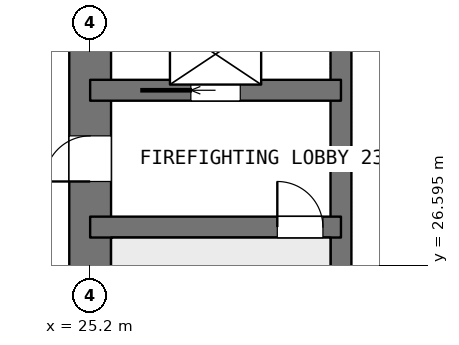
"""IFC4 building model, lengths in metres.
Left out: names, types, materials, properties, quantities, classifications, styles, units other than length and angle.
Written with IfcOpenShell. Run it as: python <this file> out.ifc"""

import sys

from ifc_helpers import new_model, si_unit, direction, frame, frame_2d, origin, place, context, subcontext, project, spatial, rectangle, extrude, element, fill, save


model = new_model("IFC4")
c1 = context("Model", 3, precision=1e-05, world=origin(), true_north=direction((0.0, 1.0)))
c2 = subcontext(c1, "Body", "Model", "MODEL_VIEW")
j1 = project(units=[si_unit("LENGTHUNIT", "METRE"), si_unit("PLANEANGLEUNIT", "RADIAN")], contexts=[c1])
p1 = place(None, origin())
s1 = spatial("IfcSite", under=j1, at=p1, CompositionType="ELEMENT")
p2 = place(p1, origin())
s2 = spatial("IfcBuilding", under=s1, at=p2, CompositionType="ELEMENT")
p3 = place(p2, frame((0.0, 0.0, 51.65)))
s3 = spatial("IfcBuildingStorey", under=s2, at=p3, CompositionType="ELEMENT", Elevation=51.65)
p4 = place(p3, frame((25.2, 21.0, 0.0), z_axis=(0.0, 0.0, 1.0), x_axis=(0.0, 1.0, 0.0)))
e1 = element("IfcWall", 1, at=p4, inside=s3, PredefinedType="SHEAR", context=c2, shape_type="SweptSolid", body=[
    extrude(rectangle(XDim=25.2, YDim=1.1, at=frame_2d((12.6, 0.0))), origin(), (0.0, 0.0, 1.0), 3.75),
])
p5 = place(p4, frame((7.8, 0.0, 0.0)))
e2 = element("IfcOpeningElement", 2, at=p5, cuts=e1, PredefinedType="OPENING", context=c2, shape_type="SweptSolid", body=[
    extrude(rectangle(XDim=1.2, YDim=2.1, at=frame_2d((0.6, 1.05))), frame((0.0, 0.56, 0.0), z_axis=(0.0, -1.0, 0.0), x_axis=(1.0, 0.0, 0.0)), (0.0, 0.0, 1.0), 1.12),
])
p6 = place(p4, frame((14.25, 0.0, 0.0)))
e3 = element("IfcOpeningElement", 3, at=p6, cuts=e1, PredefinedType="OPENING", context=c2, shape_type="SweptSolid", body=[
    extrude(rectangle(XDim=0.9, YDim=2.1, at=frame_2d((0.45, 1.05))), frame((0.0, 0.56, 0.0), z_axis=(0.0, -1.0, 0.0), x_axis=(1.0, 0.0, 0.0)), (0.0, 0.0, 1.0), 1.12),
])
p7 = place(p4, frame((16.85, 0.0, 0.0)))
e4 = element("IfcOpeningElement", 4, at=p7, cuts=e1, PredefinedType="OPENING", context=c2, shape_type="SweptSolid", body=[
    extrude(rectangle(XDim=0.9, YDim=2.1, at=frame_2d((0.45, 1.05))), frame((0.0, 0.56, 0.0), z_axis=(0.0, -1.0, 0.0), x_axis=(1.0, 0.0, 0.0)), (0.0, 0.0, 1.0), 1.12),
])
p8 = place(p4, frame((19.075, 0.0, 0.0)))
e5 = element("IfcOpeningElement", 5, at=p8, cuts=e1, PredefinedType="OPENING", context=c2, shape_type="SweptSolid", body=[
    extrude(rectangle(XDim=1.2, YDim=2.1, at=frame_2d((0.6, 1.05))), frame((0.0, 0.56, 0.0), z_axis=(0.0, -1.0, 0.0), x_axis=(1.0, 0.0, 0.0)), (0.0, 0.0, 1.0), 1.12),
])
p9 = place(p3, frame((31.8, 21.0, 0.0), z_axis=(0.0, 0.0, 1.0), x_axis=(0.0, 1.0, 0.0)))
e6 = element("IfcWall", 6, at=p9, inside=s3, PredefinedType="SHEAR", context=c2, shape_type="SweptSolid", body=[
    extrude(rectangle(XDim=25.2, YDim=0.55, at=frame_2d((12.6, 0.0))), origin(), (0.0, 0.0, 1.0), 3.75),
])
p10 = place(p3, frame((25.2, 27.6, 0.0), z_axis=(0.0, 0.0, 1.0), x_axis=(1.0, 0.0, 0.0)))
e7 = element("IfcWall", 7, at=p10, inside=s3, PredefinedType="SHEAR", context=c2, shape_type="SweptSolid", body=[
    extrude(rectangle(XDim=6.6, YDim=0.55, at=frame_2d((3.3, 0.0))), origin(), (0.0, 0.0, 1.0), 3.75),
])
p11 = place(p10, frame((4.925, 0.0, 0.0)))
e8 = element("IfcOpeningElement", 8, at=p11, cuts=e7, PredefinedType="OPENING", context=c2, shape_type="SweptSolid", body=[
    extrude(rectangle(XDim=1.2, YDim=2.1, at=frame_2d((0.6, 1.05))), frame((0.0, 0.285, 0.0), z_axis=(0.0, -1.0, 0.0), x_axis=(1.0, 0.0, 0.0)), (0.0, 0.0, 1.0), 0.57),
])
p12 = place(p3, frame((25.2, 31.2, 0.0), z_axis=(0.0, 0.0, 1.0), x_axis=(1.0, 0.0, 0.0)))
e9 = element("IfcWall", 9, at=p12, inside=s3, PredefinedType="SHEAR", context=c2, shape_type="SweptSolid", body=[
    extrude(rectangle(XDim=6.6, YDim=0.55, at=frame_2d((3.3, 0.0))), origin(), (0.0, 0.0, 1.0), 3.75),
])
p13 = place(p12, frame((2.65, 0.0, 0.0)))
e10 = element("IfcOpeningElement", 10, at=p13, cuts=e9, PredefinedType="OPENING", context=c2, shape_type="SweptSolid", body=[
    extrude(rectangle(XDim=1.3, YDim=2.1, at=frame_2d((0.65, 1.05))), frame((0.0, 0.285, 0.0), z_axis=(0.0, -1.0, 0.0), x_axis=(1.0, 0.0, 0.0)), (0.0, 0.0, 1.0), 0.57),
])
p14 = place(p3, frame((32.075, 29.4, 0.0), z_axis=(0.0, 0.0, 1.0), x_axis=(1.0, 0.0, 0.0)))
e11 = element("IfcWall", 11, at=p14, inside=s3, PredefinedType="PARTITIONING", context=c2, shape_type="SweptSolid", body=[
    extrude(rectangle(XDim=3.25, YDim=0.2, at=frame_2d((1.625, 0.0))), origin(), (0.0, 0.0, 1.0), 3.5),
])
p15 = place(p5, origin())
e12 = element("IfcDoor", 12, at=p15, inside=s3, OperationType="SINGLE_SWING_LEFT", PredefinedType="DOOR", context=c2, shape_type="SweptSolid", body=[
    extrude(rectangle(XDim=1.2, YDim=2.1, at=frame_2d((0.6, 1.05))), frame((0.0, 0.025, 0.0), z_axis=(0.0, -1.0, 0.0), x_axis=(1.0, 0.0, 0.0)), (0.0, 0.0, 1.0), 0.05),
])
fill(e2, e12)
p16 = place(p13, origin())
e13 = element("IfcDoor", 13, at=p16, inside=s3, OperationType="SLIDING_TO_LEFT", PredefinedType="USERDEFINED", context=c2, shape_type="SweptSolid", body=[
    extrude(rectangle(XDim=1.3, YDim=2.1, at=frame_2d((0.65, 1.05))), frame((0.0, 0.025, 0.0), z_axis=(0.0, -1.0, 0.0), x_axis=(1.0, 0.0, 0.0)), (0.0, 0.0, 1.0), 0.05),
])
fill(e10, e13)
p17 = place(p11, origin())
e14 = element("IfcDoor", 14, at=p17, inside=s3, OperationType="SINGLE_SWING_RIGHT", PredefinedType="DOOR", context=c2, shape_type="SweptSolid", body=[
    extrude(rectangle(XDim=1.2, YDim=2.1, at=frame_2d((0.6, 1.05))), frame((0.0, 0.025, 0.0), z_axis=(0.0, -1.0, 0.0), x_axis=(1.0, 0.0, 0.0)), (0.0, 0.0, 1.0), 0.05),
])
fill(e8, e14)
save(model, sys.argv[1])
